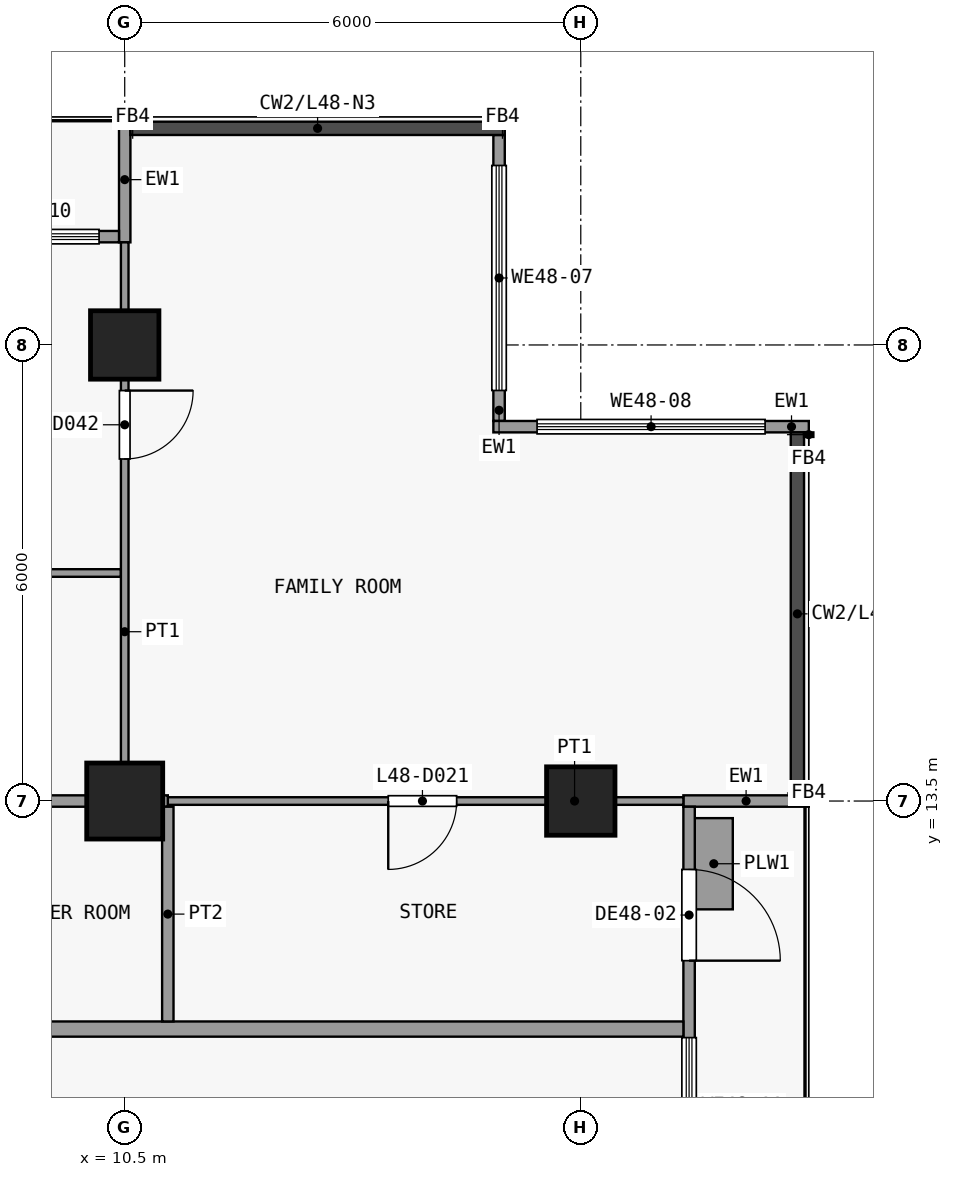
"""IFC4 building model, lengths in metres.
Left out: names, types, materials, properties, quantities, classifications, styles, units other than length and angle.
Written with IfcOpenShell. Run it as: python <this file> out.ifc"""

import sys

from ifc_helpers import new_model, si_unit, direction, frame, frame_2d, origin, origin_2d, place, context, subcontext, project, spatial, rectangle, extrude, element, fill, save


model = new_model("IFC4")
c1 = context("Model", 3, precision=1e-05, world=origin(), true_north=direction((0.0, 1.0)))
c2 = subcontext(c1, "Body", "Model", "MODEL_VIEW")
j1 = project(units=[si_unit("LENGTHUNIT", "METRE"), si_unit("PLANEANGLEUNIT", "RADIAN")], contexts=[c1])
p1 = place(None, origin())
s1 = spatial("IfcSite", under=j1, at=p1, CompositionType="ELEMENT")
p2 = place(p1, origin())
s2 = spatial("IfcBuilding", under=s1, at=p2, CompositionType="ELEMENT")
p3 = place(p2, frame((0.0, 0.0, 192.5)))
s3 = spatial("IfcBuildingStorey", under=s2, at=p3, CompositionType="ELEMENT", Elevation=192.5)
p4 = place(p3, frame((10.5, 13.5, 0.0), z_axis=(0.0, 0.0, 1.0), x_axis=(1.0, 0.0, 0.0)))
e1 = element("IfcColumn", 1, at=p4, inside=s3, PredefinedType="COLUMN", context=c2, shape_type="SweptSolid", body=[
    extrude(rectangle(XDim=1.0, YDim=1.0, at=origin_2d()), origin(), (0.0, 0.0, 1.0), 3.6),
])
for number, where, z_axis, x_axis in (
    (2, (10.5, 19.5, 0.0), (0.0, 0.0, 1.0), (1.0, 0.0, 0.0)),
    (3, (16.5, 13.5, 0.0), (0.0, 0.0, 1.0), (1.0, 0.0, 0.0)),
):
    element("IfcColumn", number, at=place(p3, frame(where, z_axis=z_axis, x_axis=x_axis)), inside=s3, PredefinedType="COLUMN", context=c2, shape_type="SweptSolid", body=[
        extrude(rectangle(XDim=0.9, YDim=0.9, at=origin_2d()), origin(), (0.0, 0.0, 1.0), 3.6),
    ])
p5 = place(p3, frame((15.425, 22.262, 0.0), z_axis=(0.0, 0.0, 1.0), x_axis=(0.0, -1.0, 0.0)))
e4 = element("IfcWall", 4, at=p5, inside=s3, PredefinedType="SOLIDWALL", context=c2, shape_type="SweptSolid", body=[
    extrude(rectangle(XDim=3.762, YDim=0.15, at=frame_2d((1.881, 0.0))), origin(), (0.0, 0.0, 1.0), 3.3),
])
p6 = place(p5, frame((0.401, 0.0, 0.9)))
e5 = element("IfcOpeningElement", 5, at=p6, cuts=e4, PredefinedType="OPENING", context=c2, shape_type="SweptSolid", body=[
    extrude(rectangle(XDim=2.96, YDim=2.4, at=frame_2d((1.48, 1.2))), frame((0.0, 0.085, 0.0), z_axis=(0.0, -1.0, 0.0), x_axis=(1.0, 0.0, 0.0)), (0.0, 0.0, 1.0), 0.17),
])
p7 = place(p3, frame((15.35, 18.425, 0.0), z_axis=(0.0, 0.0, 1.0), x_axis=(1.0, 0.0, 0.0)))
e6 = element("IfcWall", 6, at=p7, inside=s3, PredefinedType="SOLIDWALL", context=c2, shape_type="SweptSolid", body=[
    extrude(rectangle(XDim=4.15, YDim=0.15, at=frame_2d((2.075, 0.0))), origin(), (0.0, 0.0, 1.0), 3.3),
])
p8 = place(p7, frame((0.575, 0.0, 0.9)))
e7 = element("IfcOpeningElement", 7, at=p8, cuts=e6, PredefinedType="OPENING", context=c2, shape_type="SweptSolid", body=[
    extrude(rectangle(XDim=3.0, YDim=2.4, at=frame_2d((1.5, 1.2))), frame((0.0, 0.085, 0.0), z_axis=(0.0, -1.0, 0.0), x_axis=(1.0, 0.0, 0.0)), (0.0, 0.0, 1.0), 0.17),
])
p9 = place(p3, frame((10.5, 20.85, 0.0), z_axis=(0.0, 0.0, 1.0), x_axis=(0.0, 1.0, 0.0)))
e8 = element("IfcWall", 8, at=p9, inside=s3, PredefinedType="SOLIDWALL", context=c2, shape_type="SweptSolid", body=[
    extrude(rectangle(XDim=1.65, YDim=0.15, at=frame_2d((0.825, 0.0))), origin(), (0.0, 0.0, 1.0), 3.3),
])
p10 = place(p3, frame((4.575, 20.925, 0.0), z_axis=(0.0, 0.0, 1.0), x_axis=(1.0, 0.0, 0.0)))
e9 = element("IfcWall", 9, at=p10, inside=s3, PredefinedType="SOLIDWALL", context=c2, shape_type="SweptSolid", body=[
    extrude(rectangle(XDim=5.85, YDim=0.15, at=frame_2d((2.925, 0.0))), origin(), (0.0, 0.0, 1.0), 3.3),
])
p11 = place(p10, frame((2.325, 0.0, 0.0)))
e10 = element("IfcOpeningElement", 10, at=p11, cuts=e9, PredefinedType="OPENING", context=c2, shape_type="SweptSolid", body=[
    extrude(rectangle(XDim=1.2, YDim=2.4, at=frame_2d((0.6, 1.2))), frame((0.0, 0.085, 0.0), z_axis=(0.0, -1.0, 0.0), x_axis=(1.0, 0.0, 0.0)), (0.0, 0.0, 1.0), 0.17),
])
p12 = place(p10, frame((0.262, 0.0, 0.9)))
e11 = element("IfcOpeningElement", 11, at=p12, cuts=e9, PredefinedType="OPENING", context=c2, shape_type="SweptSolid", body=[
    extrude(rectangle(XDim=1.8, YDim=2.1, at=frame_2d((0.9, 1.05))), frame((0.0, 0.085, 0.0), z_axis=(0.0, -1.0, 0.0), x_axis=(1.0, 0.0, 0.0)), (0.0, 0.0, 1.0), 0.17),
])
p13 = place(p10, frame((3.788, 0.0, 0.9)))
e12 = element("IfcOpeningElement", 12, at=p13, cuts=e9, PredefinedType="OPENING", context=c2, shape_type="SweptSolid", body=[
    extrude(rectangle(XDim=1.8, YDim=2.1, at=frame_2d((0.9, 1.05))), frame((0.0, 0.085, 0.0), z_axis=(0.0, -1.0, 0.0), x_axis=(1.0, 0.0, 0.0)), (0.0, 0.0, 1.0), 0.17),
])
p14 = place(p3, frame((17.85, 13.5, 0.0), z_axis=(0.0, 0.0, 1.0), x_axis=(1.0, 0.0, 0.0)))
e13 = element("IfcWall", 13, at=p14, inside=s3, PredefinedType="SOLIDWALL", context=c2, shape_type="SweptSolid", body=[
    extrude(rectangle(XDim=1.65, YDim=0.15, at=frame_2d((0.825, 0.0))), origin(), (0.0, 0.0, 1.0), 3.3),
])
p15 = place(p3, frame((17.925, 13.425, 0.0), z_axis=(0.0, 0.0, 1.0), x_axis=(0.0, -1.0, 0.0)))
e14 = element("IfcWall", 14, at=p15, inside=s3, PredefinedType="SOLIDWALL", context=c2, shape_type="SweptSolid", body=[
    extrude(rectangle(XDim=5.85, YDim=0.15, at=frame_2d((2.925, 0.0))), origin(), (0.0, 0.0, 1.0), 3.3),
])
p16 = place(p15, frame((0.825, 0.0, 0.0)))
e15 = element("IfcOpeningElement", 15, at=p16, cuts=e14, PredefinedType="OPENING", context=c2, shape_type="SweptSolid", body=[
    extrude(rectangle(XDim=1.2, YDim=2.4, at=frame_2d((0.6, 1.2))), frame((0.0, 0.085, 0.0), z_axis=(0.0, -1.0, 0.0), x_axis=(1.0, 0.0, 0.0)), (0.0, 0.0, 1.0), 0.17),
])
p17 = place(p15, frame((3.038, 0.0, 0.9)))
e16 = element("IfcOpeningElement", 16, at=p17, cuts=e14, PredefinedType="OPENING", context=c2, shape_type="SweptSolid", body=[
    extrude(rectangle(XDim=1.8, YDim=2.1, at=frame_2d((0.9, 1.05))), frame((0.0, 0.085, 0.0), z_axis=(0.0, -1.0, 0.0), x_axis=(1.0, 0.0, 0.0)), (0.0, 0.0, 1.0), 0.17),
])
p18 = place(p3, frame((18.25, 12.075, 0.0), z_axis=(0.0, 0.0, 1.0), x_axis=(0.0, 1.0, 0.0)))
e17 = element("IfcWall", 17, at=p18, inside=s3, PredefinedType="USERDEFINED", context=c2, shape_type="SweptSolid", body=[
    extrude(rectangle(XDim=1.2, YDim=0.5, at=frame_2d((0.6, 0.0))), origin(), (0.0, 0.0, 1.0), 0.9),
])
p19 = place(p3, frame((-19.35, 10.5, 0.0), z_axis=(0.0, 0.0, 1.0), x_axis=(1.0, 0.0, 0.0)))
e18 = element("IfcWall", 18, at=p19, inside=s3, PredefinedType="PARTITIONING", context=c2, shape_type="SweptSolid", body=[
    extrude(rectangle(XDim=37.2, YDim=0.2, at=frame_2d((18.6, 0.0))), origin(), (0.0, 0.0, 1.0), 3.3),
])
p20 = place(p19, frame((7.05, 0.0, 0.0)))
e19 = element("IfcOpeningElement", 19, at=p20, cuts=e18, PredefinedType="OPENING", context=c2, shape_type="SweptSolid", body=[
    extrude(rectangle(XDim=1.0, YDim=2.1, at=frame_2d((0.5, 1.05))), frame((0.0, 0.11, 0.0), z_axis=(0.0, -1.0, 0.0), x_axis=(1.0, 0.0, 0.0)), (0.0, 0.0, 1.0), 0.22),
])
p21 = place(p19, frame((18.05, 0.0, 0.0)))
e20 = element("IfcOpeningElement", 20, at=p21, cuts=e18, PredefinedType="OPENING", context=c2, shape_type="SweptSolid", body=[
    extrude(rectangle(XDim=1.0, YDim=2.1, at=frame_2d((0.5, 1.05))), frame((0.0, 0.11, 0.0), z_axis=(0.0, -1.0, 0.0), x_axis=(1.0, 0.0, 0.0)), (0.0, 0.0, 1.0), 0.22),
])
p22 = place(p3, frame((11.067, 13.5, 0.0), z_axis=(0.0, 0.0, 1.0), x_axis=(1.0, 0.0, 0.0)))
e21 = element("IfcWall", 21, at=p22, inside=s3, PredefinedType="PARTITIONING", context=c2, shape_type="SweptSolid", body=[
    extrude(rectangle(XDim=6.783, YDim=0.1, at=frame_2d((3.392, 0.0))), origin(), (0.0, 0.0, 1.0), 3.3),
])
p23 = place(p22, frame((2.9, 0.0, 0.0)))
e22 = element("IfcOpeningElement", 22, at=p23, cuts=e21, PredefinedType="OPENING", context=c2, shape_type="SweptSolid", body=[
    extrude(rectangle(XDim=0.9, YDim=2.1, at=frame_2d((0.45, 1.05))), frame((0.0, 0.06, 0.0), z_axis=(0.0, -1.0, 0.0), x_axis=(1.0, 0.0, 0.0)), (0.0, 0.0, 1.0), 0.12),
])
p24 = place(p3, frame((0.4, 13.5, 0.0), z_axis=(0.0, 0.0, 1.0), x_axis=(1.0, 0.0, 0.0)))
e23 = element("IfcWall", 23, at=p24, inside=s3, PredefinedType="PARTITIONING", context=c2, shape_type="SweptSolid", body=[
    extrude(rectangle(XDim=10.667, YDim=0.15, at=frame_2d((5.333, 0.0))), origin(), (0.0, 0.0, 1.0), 3.3),
])
p25 = place(p3, frame((4.55, 16.5, 0.0), z_axis=(0.0, 0.0, 1.0), x_axis=(1.0, 0.0, 0.0)))
e24 = element("IfcWall", 24, at=p25, inside=s3, PredefinedType="PARTITIONING", context=c2, shape_type="SweptSolid", body=[
    extrude(rectangle(XDim=5.9, YDim=0.1, at=frame_2d((2.95, 0.0))), origin(), (0.0, 0.0, 1.0), 3.3),
])
p26 = place(p25, frame((2.5, 0.0, 0.0)))
e25 = element("IfcOpeningElement", 25, at=p26, cuts=e24, PredefinedType="OPENING", context=c2, shape_type="SweptSolid", body=[
    extrude(rectangle(XDim=0.9, YDim=2.1, at=frame_2d((0.45, 1.05))), frame((0.0, 0.06, 0.0), z_axis=(0.0, -1.0, 0.0), x_axis=(1.0, 0.0, 0.0)), (0.0, 0.0, 1.0), 0.12),
])
p27 = place(p3, frame((10.5, 13.575, 0.0), z_axis=(0.0, 0.0, 1.0), x_axis=(0.0, 1.0, 0.0)))
e26 = element("IfcWall", 26, at=p27, inside=s3, PredefinedType="PARTITIONING", context=c2, shape_type="SweptSolid", body=[
    extrude(rectangle(XDim=7.275, YDim=0.1, at=frame_2d((3.638, 0.0))), origin(), (0.0, 0.0, 1.0), 3.3),
])
p28 = place(p27, frame((4.425, 0.0, 0.0)))
e27 = element("IfcOpeningElement", 27, at=p28, cuts=e26, PredefinedType="OPENING", context=c2, shape_type="SweptSolid", body=[
    extrude(rectangle(XDim=0.9, YDim=2.1, at=frame_2d((0.45, 1.05))), frame((0.0, 0.06, 0.0), z_axis=(0.0, -1.0, 0.0), x_axis=(1.0, 0.0, 0.0)), (0.0, 0.0, 1.0), 0.12),
])
p29 = place(p3, frame((11.067, 10.6, 0.0), z_axis=(0.0, 0.0, 1.0), x_axis=(0.0, 1.0, 0.0)))
e28 = element("IfcWall", 28, at=p29, inside=s3, PredefinedType="PARTITIONING", context=c2, shape_type="SweptSolid", body=[
    extrude(rectangle(XDim=2.825, YDim=0.15, at=frame_2d((1.413, 0.0))), origin(), (0.0, 0.0, 1.0), 3.3),
])
p30 = place(p6, origin())
e29 = element("IfcWindow", 29, at=p30, inside=s3, PartitioningType="SINGLE_PANEL", PredefinedType="WINDOW", context=c2, shape_type="SweptSolid", body=[
    extrude(rectangle(XDim=2.96, YDim=2.4, at=frame_2d((1.48, 1.2))), frame((0.0, 0.03, 0.0), z_axis=(0.0, -1.0, 0.0), x_axis=(1.0, 0.0, 0.0)), (0.0, 0.0, 1.0), 0.06),
])
fill(e5, e29)
p31 = place(p8, origin())
e30 = element("IfcWindow", 30, at=p31, inside=s3, PartitioningType="SINGLE_PANEL", PredefinedType="WINDOW", context=c2, shape_type="SweptSolid", body=[
    extrude(rectangle(XDim=3.0, YDim=2.4, at=frame_2d((1.5, 1.2))), frame((0.0, 0.03, 0.0), z_axis=(0.0, -1.0, 0.0), x_axis=(1.0, 0.0, 0.0)), (0.0, 0.0, 1.0), 0.06),
])
fill(e7, e30)
p32 = place(p13, origin())
e31 = element("IfcWindow", 31, at=p32, inside=s3, PartitioningType="SINGLE_PANEL", PredefinedType="WINDOW", context=c2, shape_type="SweptSolid", body=[
    extrude(rectangle(XDim=1.8, YDim=2.1, at=frame_2d((0.9, 1.05))), frame((0.0, 0.03, 0.0), z_axis=(0.0, -1.0, 0.0), x_axis=(1.0, 0.0, 0.0)), (0.0, 0.0, 1.0), 0.06),
])
fill(e12, e31)
p33 = place(p16, origin())
e32 = element("IfcDoor", 32, at=p33, inside=s3, OperationType="SINGLE_SWING_RIGHT", PredefinedType="DOOR", context=c2, shape_type="SweptSolid", body=[
    extrude(rectangle(XDim=1.2, YDim=2.4, at=frame_2d((0.6, 1.2))), frame((0.0, 0.025, 0.0), z_axis=(0.0, -1.0, 0.0), x_axis=(1.0, 0.0, 0.0)), (0.0, 0.0, 1.0), 0.05),
])
fill(e15, e32)
p34 = place(p17, origin())
e33 = element("IfcWindow", 33, at=p34, inside=s3, PartitioningType="SINGLE_PANEL", PredefinedType="WINDOW", context=c2, shape_type="SweptSolid", body=[
    extrude(rectangle(XDim=1.8, YDim=2.1, at=frame_2d((0.9, 1.05))), frame((0.0, 0.03, 0.0), z_axis=(0.0, -1.0, 0.0), x_axis=(1.0, 0.0, 0.0)), (0.0, 0.0, 1.0), 0.06),
])
fill(e16, e33)
p35 = place(p23, origin())
e34 = element("IfcDoor", 34, at=p35, inside=s3, OperationType="SINGLE_SWING_LEFT", PredefinedType="DOOR", context=c2, shape_type="SweptSolid", body=[
    extrude(rectangle(XDim=0.9, YDim=2.1, at=frame_2d((0.45, 1.05))), frame((0.0, 0.025, 0.0), z_axis=(0.0, -1.0, 0.0), x_axis=(1.0, 0.0, 0.0)), (0.0, 0.0, 1.0), 0.05),
])
fill(e22, e34)
p36 = place(p28, origin())
e35 = element("IfcDoor", 35, at=p36, inside=s3, OperationType="SINGLE_SWING_RIGHT", PredefinedType="DOOR", context=c2, shape_type="SweptSolid", body=[
    extrude(rectangle(XDim=0.9, YDim=2.1, at=frame_2d((0.45, 1.05))), frame((0.0, 0.025, 0.0), z_axis=(0.0, -1.0, 0.0), x_axis=(1.0, 0.0, 0.0)), (0.0, 0.0, 1.0), 0.05),
])
fill(e27, e35)
save(model, sys.argv[1])
